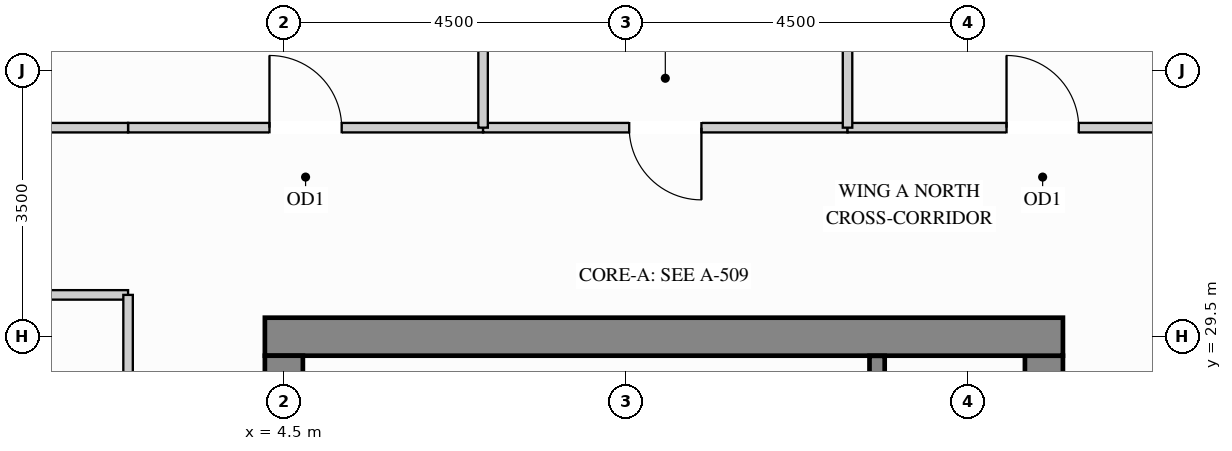
"""IFC4 building model, lengths in metres.
Left out: names, types, materials, properties, quantities, classifications, styles, units other than length and angle.
Written with IfcOpenShell. Run it as: python <this file> out.ifc"""

import sys

from ifc_helpers import new_model, si_unit, direction, frame, frame_2d, origin, place, context, subcontext, project, spatial, rectangle, extrude, source, transform, mapped, element, fill, save


model = new_model("IFC4")
c1 = context("Model", 3, precision=1e-05, world=origin(), true_north=direction((0.0, 1.0)))
c2 = subcontext(c1, "Body", "Model", "MODEL_VIEW")
j1 = project(units=[si_unit("LENGTHUNIT", "METRE"), si_unit("PLANEANGLEUNIT", "RADIAN")], contexts=[c1])
p1 = place(None, origin())
s1 = spatial("IfcSite", under=j1, at=p1, CompositionType="ELEMENT")
p2 = place(p1, origin())
s2 = spatial("IfcBuilding", under=s1, at=p2, CompositionType="ELEMENT")
p3 = place(p2, frame((0.0, 0.0, 259.2)))
s3 = spatial("IfcBuildingStorey", under=s2, at=p3, CompositionType="ELEMENT", Elevation=259.2)
m1 = source(origin(), c2, "Body", "SweptSolid", [
    extrude(rectangle(XDim=8.37, YDim=0.5, at=frame_2d((4.185, 0.0))), origin(), (0.0, 0.0, 1.0), 3.4),
])
p4 = place(p3, frame((14.5, 20.88, 0.0), z_axis=(0.0, 0.0, 1.0), x_axis=(0.0, 1.0, 0.0)))
e1 = element("IfcWall", 1, at=p4, inside=s3, PredefinedType="SHEAR", context=c2, shape_type="MappedRepresentation", body=[
    mapped(m1, transform((0.0, 0.0, 0.0), x_axis=(1.0, 0.0, 0.0), y_axis=(0.0, 1.0, 0.0), z_axis=(0.0, 0.0, 1.0))),
])
m2 = source(origin(), c2, "Body", "SweptSolid", [
    extrude(rectangle(XDim=10.5, YDim=0.5, at=frame_2d((5.25, 0.0))), origin(), (0.0, 0.0, 1.0), 3.4),
])
p5 = place(p3, frame((4.25, 29.5, 0.0), z_axis=(0.0, 0.0, 1.0), x_axis=(1.0, 0.0, 0.0)))
e2 = element("IfcWall", 2, at=p5, inside=s3, PredefinedType="SHEAR", context=c2, shape_type="MappedRepresentation", body=[
    mapped(m2, transform((0.0, 0.0, 0.0), x_axis=(1.0, 0.0, 0.0), y_axis=(0.0, 1.0, 0.0), z_axis=(0.0, 0.0, 1.0))),
])
m3 = source(origin(), c2, "Body", "SweptSolid", [
    extrude(rectangle(XDim=20.5, YDim=0.5, at=frame_2d((10.25, 0.0))), origin(), (0.0, 0.0, 1.0), 3.4),
])
p6 = place(p3, frame((4.5, 8.75, 0.0), z_axis=(0.0, 0.0, 1.0), x_axis=(0.0, 1.0, 0.0)))
e3 = element("IfcWall", 3, at=p6, inside=s3, PredefinedType="SHEAR", context=c2, shape_type="MappedRepresentation", body=[
    mapped(m3, transform((0.0, 0.0, 0.0), x_axis=(1.0, 0.0, 0.0), y_axis=(0.0, 1.0, 0.0), z_axis=(0.0, 0.0, 1.0))),
])
p7 = place(p3, frame((2.45, 32.25, 0.0), z_axis=(0.0, 0.0, 1.0), x_axis=(1.0, 0.0, 0.0)))
e4 = element("IfcWall", 4, at=p7, inside=s3, PredefinedType="PARTITIONING", context=c2, shape_type="SweptSolid", body=[
    extrude(rectangle(XDim=4.671, YDim=0.125, at=frame_2d((2.335, 0.0))), origin(), (0.0, 0.0, 1.0), 3.385),
])
p8 = place(p7, frame((1.861, 0.0, 0.0)))
e5 = element("IfcOpeningElement", 5, at=p8, cuts=e4, PredefinedType="OPENING", context=c2, shape_type="SweptSolid", body=[
    extrude(rectangle(XDim=0.95, YDim=2.15, at=frame_2d((0.475, 1.075))), frame((0.0, 0.073, 0.0), z_axis=(0.0, -1.0, 0.0), x_axis=(1.0, 0.0, 0.0)), (0.0, 0.0, 1.0), 0.145),
])
p9 = place(p3, frame((7.121, 32.25, 0.0), z_axis=(0.0, 0.0, 1.0), x_axis=(1.0, 0.0, 0.0)))
e6 = element("IfcWall", 6, at=p9, inside=s3, PredefinedType="PARTITIONING", context=c2, shape_type="SweptSolid", body=[
    extrude(rectangle(XDim=4.795, YDim=0.125, at=frame_2d((2.397, 0.0))), origin(), (0.0, 0.0, 1.0), 3.385),
])
p10 = place(p9, frame((1.923, 0.0, 0.0)))
e7 = element("IfcOpeningElement", 7, at=p10, cuts=e6, PredefinedType="OPENING", context=c2, shape_type="SweptSolid", body=[
    extrude(rectangle(XDim=0.95, YDim=2.15, at=frame_2d((0.475, 1.075))), frame((0.0, 0.073, 0.0), z_axis=(0.0, -1.0, 0.0), x_axis=(1.0, 0.0, 0.0)), (0.0, 0.0, 1.0), 0.145),
])
p11 = place(p3, frame((11.916, 32.25, 0.0), z_axis=(0.0, 0.0, 1.0), x_axis=(1.0, 0.0, 0.0)))
e8 = element("IfcWall", 8, at=p11, inside=s3, PredefinedType="PARTITIONING", context=c2, shape_type="SweptSolid", body=[
    extrude(rectangle(XDim=5.134, YDim=0.125, at=frame_2d((2.567, 0.0))), origin(), (0.0, 0.0, 1.0), 3.385),
])
p12 = place(p11, frame((2.092, 0.0, 0.0)))
e9 = element("IfcOpeningElement", 9, at=p12, cuts=e8, PredefinedType="OPENING", context=c2, shape_type="SweptSolid", body=[
    extrude(rectangle(XDim=0.95, YDim=2.15, at=frame_2d((0.475, 1.075))), frame((0.0, 0.073, 0.0), z_axis=(0.0, -1.0, 0.0), x_axis=(1.0, 0.0, 0.0)), (0.0, 0.0, 1.0), 0.145),
])
m4 = source(origin(), c2, "Body", "SweptSolid", [
    extrude(rectangle(XDim=2.24, YDim=0.125, at=frame_2d((1.12, 0.0))), origin(), (0.0, 0.0, 1.0), 3.385),
])
p13 = place(p3, frame((0.21, 32.25, 0.0), z_axis=(0.0, 0.0, 1.0), x_axis=(1.0, 0.0, 0.0)))
e10 = element("IfcWall", 10, at=p13, inside=s3, PredefinedType="PARTITIONING", context=c2, shape_type="MappedRepresentation", body=[
    mapped(m4, transform((0.0, 0.0, 0.0), x_axis=(1.0, 0.0, 0.0), y_axis=(0.0, 1.0, 0.0), z_axis=(0.0, 0.0, 1.0))),
])
m5 = source(origin(), c2, "Body", "SweptSolid", [
    extrude(rectangle(XDim=5.898, YDim=0.125, at=frame_2d((2.949, 0.0))), origin(), (0.0, 0.0, 1.0), 3.385),
])
for number, where, z_axis, x_axis in (
    (11, (7.121, 32.25, 0.0), (0.0, 0.0, 1.0), (0.0, 1.0, 0.0)),
    (12, (11.916, 32.25, 0.0), (0.0, 0.0, 1.0), (0.0, 1.0, 0.0)),
):
    element("IfcWall", number, at=place(p3, frame(where, z_axis=z_axis, x_axis=x_axis)), inside=s3, PredefinedType="PARTITIONING", context=c2, shape_type="MappedRepresentation", body=[
        mapped(m5, transform((0.0, 0.0, 0.0), x_axis=(1.0, 0.0, 0.0), y_axis=(0.0, 1.0, 0.0), z_axis=(0.0, 0.0, 1.0))),
    ])
m6 = source(origin(), c2, "Body", "SweptSolid", [
    extrude(rectangle(XDim=1.4, YDim=0.125, at=frame_2d((0.7, 0.0))), origin(), (0.0, 0.0, 1.0), 1.585),
])
p14 = place(p3, frame((1.05, 30.05, 0.0), z_axis=(0.0, 0.0, 1.0), x_axis=(1.0, 0.0, 0.0)))
e13 = element("IfcWall", 13, at=p14, inside=s3, PredefinedType="PARTITIONING", context=c2, shape_type="MappedRepresentation", body=[
    mapped(m6, transform((0.0, 0.0, 0.0), x_axis=(1.0, 0.0, 0.0), y_axis=(0.0, 1.0, 0.0), z_axis=(0.0, 0.0, 1.0))),
])
p15 = place(p3, frame((2.45, 22.6, 0.0), z_axis=(0.0, 0.0, 1.0), x_axis=(0.0, 1.0, 0.0)))
e14 = element("IfcWall", 14, at=p15, inside=s3, PredefinedType="PARTITIONING", context=c2, shape_type="SweptSolid", body=[
    extrude(rectangle(XDim=7.45, YDim=0.125, at=frame_2d((3.725, 0.0))), origin(), (0.0, 0.0, 1.0), 3.385),
])
p16 = place(p15, frame((3.25, 0.0, 0.0)))
e15 = element("IfcOpeningElement", 15, at=p16, cuts=e14, PredefinedType="OPENING", context=c2, shape_type="SweptSolid", body=[
    extrude(rectangle(XDim=0.95, YDim=2.15, at=frame_2d((0.475, 1.075))), frame((0.0, 0.073, 0.0), z_axis=(0.0, -1.0, 0.0), x_axis=(1.0, 0.0, 0.0)), (0.0, 0.0, 1.0), 0.145),
])
m7 = source(origin(), c2, "Body", "SweptSolid", [
    extrude(rectangle(XDim=3.803, YDim=0.2, at=frame_2d((1.901, 0.0))), origin(), (0.0, 0.0, 1.0), 3.4),
])
p17 = place(p3, frame((12.305, 25.445, 0.0), z_axis=(0.0, 0.0, 1.0), x_axis=(0.0, 1.0, 0.0)))
e16 = element("IfcWall", 16, at=p17, inside=s3, PredefinedType="SHEAR", context=c2, shape_type="MappedRepresentation", body=[
    mapped(m7, transform((0.0, 0.0, 0.0), x_axis=(1.0, 0.0, 0.0), y_axis=(0.0, 1.0, 0.0), z_axis=(0.0, 0.0, 1.0))),
])
m8 = source(origin(), c2, "Body", "SweptSolid", [
    extrude(rectangle(XDim=0.95, YDim=2.15, at=frame_2d((0.475, 1.075))), frame((0.0, 0.025, 0.0), z_axis=(0.0, -1.0, 0.0), x_axis=(1.0, 0.0, 0.0)), (0.0, 0.0, 1.0), 0.05),
])
p18 = place(p8, origin())
e17 = element("IfcDoor", 17, at=p18, inside=s3, OperationType="SINGLE_SWING_LEFT", PredefinedType="DOOR", context=c2, shape_type="MappedRepresentation", body=[
    mapped(m8, transform((0.0, 0.0, 0.0), x_axis=(1.0, 0.0, 0.0), y_axis=(0.0, 1.0, 0.0), z_axis=(0.0, 0.0, 1.0))),
])
fill(e5, e17)
p19 = place(p10, origin())
e18 = element("IfcDoor", 18, at=p19, inside=s3, OperationType="SINGLE_SWING_RIGHT", PredefinedType="DOOR", context=c2, shape_type="MappedRepresentation", body=[
    mapped(m8, transform((0.0, 0.0, 0.0), x_axis=(1.0, 0.0, 0.0), y_axis=(0.0, 1.0, 0.0), z_axis=(0.0, 0.0, 1.0))),
])
fill(e7, e18)
p20 = place(p12, origin())
e19 = element("IfcDoor", 19, at=p20, inside=s3, OperationType="SINGLE_SWING_LEFT", PredefinedType="DOOR", context=c2, shape_type="MappedRepresentation", body=[
    mapped(m8, transform((0.0, 0.0, 0.0), x_axis=(1.0, 0.0, 0.0), y_axis=(0.0, 1.0, 0.0), z_axis=(0.0, 0.0, 1.0))),
])
fill(e9, e19)
save(model, sys.argv[1])
